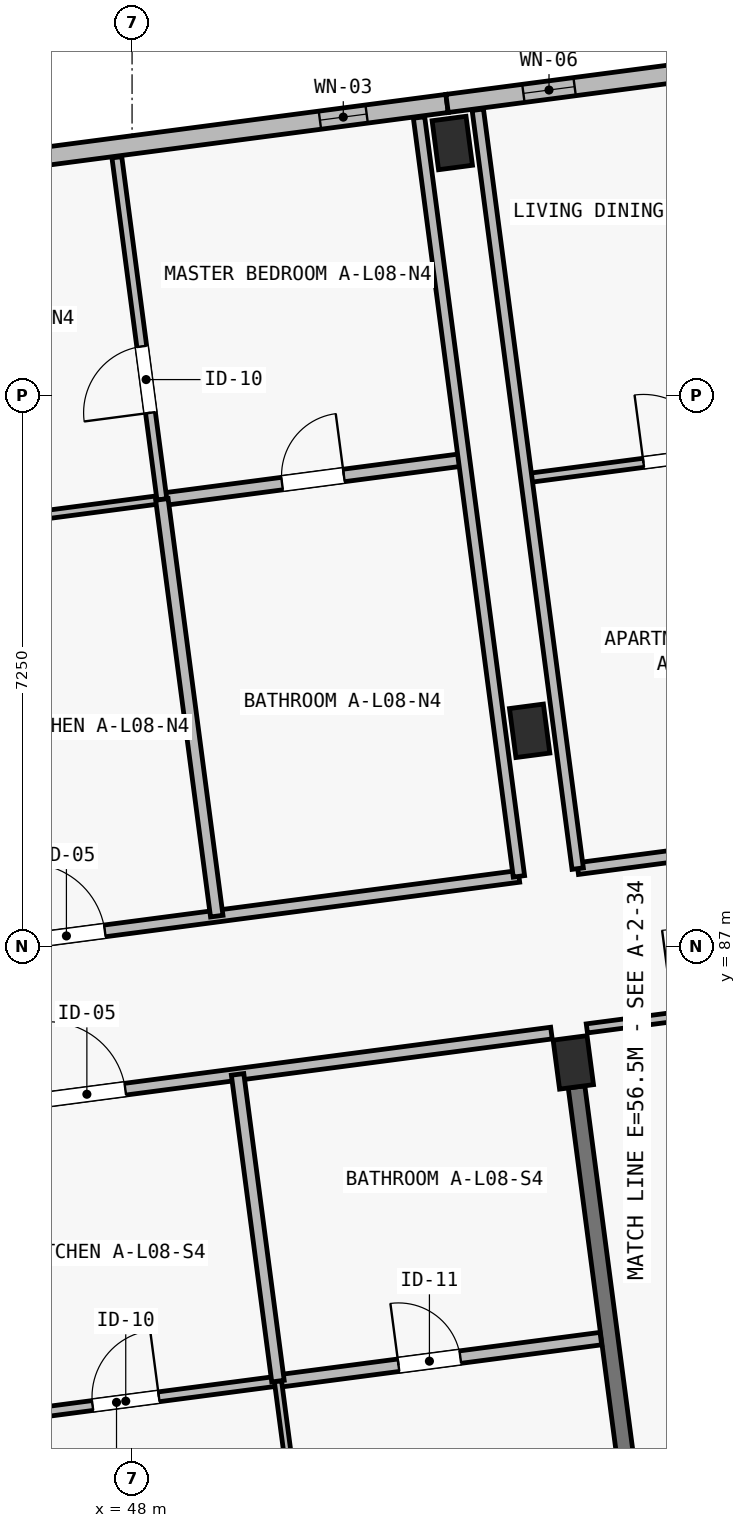
"""IFC4 building model, lengths in metres.
Left out: names, types, materials, properties, quantities, classifications, styles, units other than length and angle.
Written with IfcOpenShell. Run it as: python <this file> out.ifc"""

import sys

from ifc_helpers import new_model, si_unit, direction, frame, frame_2d, origin, origin_2d, place, context, subcontext, project, spatial, rectangle, extrude, element, fill, save


model = new_model("IFC4")
c1 = context("Model", 3, precision=1e-05, world=origin(), true_north=direction((0.0, 1.0)))
c2 = subcontext(c1, "Body", "Model", "MODEL_VIEW")
j1 = project(units=[si_unit("LENGTHUNIT", "METRE"), si_unit("PLANEANGLEUNIT", "RADIAN")], contexts=[c1])
p1 = place(None, origin())
s1 = spatial("IfcSite", under=j1, at=p1, CompositionType="ELEMENT")
p2 = place(p1, origin())
s2 = spatial("IfcBuilding", under=s1, at=p2, CompositionType="ELEMENT")
p3 = place(p2, frame((0.0, 0.0, 27.9)))
s3 = spatial("IfcBuildingStorey", under=s2, at=p3, CompositionType="ELEMENT", Elevation=27.9)
for number, where, z_axis, x_axis in (
    (1, (53.805, 85.476, 0.0), (0.0, 0.0, 1.0), (0.991, 0.131, 0.0)),
    (2, (53.231, 89.839, 0.0), (0.0, 0.0, 1.0), (0.991, 0.131, 0.0)),
    (3, (52.213, 97.572, 0.0), (0.0, 0.0, 1.0), (0.991, 0.131, 0.0)),
):
    element("IfcColumn", number, at=place(p3, frame(where, z_axis=z_axis, x_axis=x_axis)), inside=s3, PredefinedType="COLUMN", context=c2, shape_type="SweptSolid", body=[
        extrude(rectangle(XDim=0.45, YDim=0.65, at=origin_2d()), origin(), (0.0, 0.0, 1.0), 3.25),
    ])
p4 = place(p3, frame((54.781, 78.065, 0.0), z_axis=(0.0, 0.0, 1.0), x_axis=(-0.130537539388, 0.991443367425, 0.0)))
e4 = element("IfcWall", 4, at=p4, inside=s3, PredefinedType="SHEAR", context=c2, shape_type="SweptSolid", body=[
    extrude(rectangle(XDim=7.15, YDim=0.22, at=frame_2d((3.575, 0.0))), origin(), (0.0, 0.0, 1.0), 2.5),
])
p5 = place(p3, frame((43.42, 96.944, 0.0), z_axis=(0.0, 0.0, 1.0), x_axis=(0.991443905089, 0.130533455715, 0.0)))
e5 = element("IfcWall", 5, at=p5, inside=s3, PredefinedType="SOLIDWALL", context=c2, shape_type="SweptSolid", body=[
    extrude(rectangle(XDim=8.8, YDim=0.24, at=frame_2d((4.4, 0.0))), origin(), (0.0, 0.0, 1.0), 3.0),
])
p6 = place(p5, frame((1.552, 0.0, 0.44)))
e6 = element("IfcOpeningElement", 6, at=p6, cuts=e5, PredefinedType="OPENING", context=c2, shape_type="SweptSolid", body=[
    extrude(rectangle(XDim=0.84, YDim=2.28, at=frame_2d((0.42, 1.14))), frame((0.0, 0.135, 0.0), z_axis=(0.0, -1.0, 0.0), x_axis=(1.0, 0.0, 0.0)), (0.0, 0.0, 1.0), 0.27),
])
p7 = place(p5, frame((7.113, 0.0, 0.5)))
e7 = element("IfcOpeningElement", 7, at=p7, cuts=e5, PredefinedType="OPENING", context=c2, shape_type="SweptSolid", body=[
    extrude(rectangle(XDim=0.62, YDim=2.28, at=frame_2d((0.31, 1.14))), frame((0.0, 0.135, 0.0), z_axis=(0.0, -1.0, 0.0), x_axis=(1.0, 0.0, 0.0)), (0.0, 0.0, 1.0), 0.27),
])
p8 = place(p3, frame((52.145, 98.093, 0.0), z_axis=(0.0, 0.0, 1.0), x_axis=(0.991442885224, 0.130541201693, 0.0)))
e8 = element("IfcWall", 8, at=p8, inside=s3, PredefinedType="SOLIDWALL", context=c2, shape_type="SweptSolid", body=[
    extrude(rectangle(XDim=9.325, YDim=0.24, at=frame_2d((4.663, 0.0))), origin(), (0.0, 0.0, 1.0), 3.0),
])
p9 = place(p8, frame((1.013, 0.0, 0.5)))
e9 = element("IfcOpeningElement", 9, at=p9, cuts=e8, PredefinedType="OPENING", context=c2, shape_type="SweptSolid", body=[
    extrude(rectangle(XDim=0.68, YDim=2.24, at=frame_2d((0.34, 1.12))), frame((0.0, 0.135, 0.0), z_axis=(0.0, -1.0, 0.0), x_axis=(1.0, 0.0, 0.0)), (0.0, 0.0, 1.0), 0.27),
])
p10 = place(p8, frame((6.448, 0.0, 0.44)))
e10 = element("IfcOpeningElement", 10, at=p10, cuts=e8, PredefinedType="OPENING", context=c2, shape_type="SweptSolid", body=[
    extrude(rectangle(XDim=0.76, YDim=2.34, at=frame_2d((0.38, 1.17))), frame((0.0, 0.135, 0.0), z_axis=(0.0, -1.0, 0.0), x_axis=(1.0, 0.0, 0.0)), (0.0, 0.0, 1.0), 0.27),
])
p11 = place(p3, frame((45.259, 84.775, 0.0), z_axis=(0.0, 0.0, 1.0), x_axis=(0.991446412738, 0.130514407897, 0.0)))
e11 = element("IfcWall", 11, at=p11, inside=s3, PredefinedType="PARTITIONING", context=c2, shape_type="SweptSolid", body=[
    extrude(rectangle(XDim=8.33, YDim=0.155, at=frame_2d((4.165, 0.0))), origin(), (0.0, 0.0, 1.0), 2.97),
])
p12 = place(p11, frame((1.655, 0.0, 0.0)))
e12 = element("IfcOpeningElement", 12, at=p12, cuts=e11, PredefinedType="OPENING", context=c2, shape_type="SweptSolid", body=[
    extrude(rectangle(XDim=1.02, YDim=2.2, at=frame_2d((0.51, 1.1))), frame((0.0, 0.093, 0.0), z_axis=(0.0, -1.0, 0.0), x_axis=(1.0, 0.0, 0.0)), (0.0, 0.0, 1.0), 0.185),
])
p13 = place(p3, frame((45.671, 80.724, 0.0), z_axis=(0.0, 0.0, 1.0), x_axis=(0.991444014242, 0.130532626667, 0.0)))
e13 = element("IfcWall", 13, at=p13, inside=s3, PredefinedType="PARTITIONING", context=c2, shape_type="SweptSolid", body=[
    extrude(rectangle(XDim=4.285, YDim=0.13, at=frame_2d((2.143, 0.0))), origin(), (0.0, 0.0, 1.0), 2.97),
])
p14 = place(p13, frame((1.825, 0.0, 0.0)))
e14 = element("IfcOpeningElement", 14, at=p14, cuts=e13, PredefinedType="OPENING", context=c2, shape_type="SweptSolid", body=[
    extrude(rectangle(XDim=0.88, YDim=2.1, at=frame_2d((0.44, 1.05))), frame((0.0, 0.08, 0.0), z_axis=(0.0, -1.0, 0.0), x_axis=(1.0, 0.0, 0.0)), (0.0, 0.0, 1.0), 0.16),
])
p15 = place(p3, frame((49.919, 81.283, 0.0), z_axis=(0.0, 0.0, 1.0), x_axis=(0.991452356241, 0.130469250419, 0.0)))
e15 = element("IfcWall", 15, at=p15, inside=s3, PredefinedType="PLUMBINGWALL", context=c2, shape_type="SweptSolid", body=[
    extrude(rectangle(XDim=4.285, YDim=0.165, at=frame_2d((2.143, 0.0))), origin(), (0.0, 0.0, 1.0), 2.97),
])
p16 = place(p15, frame((1.6, 0.0, 0.0)))
e16 = element("IfcOpeningElement", 16, at=p16, cuts=e15, PredefinedType="OPENING", context=c2, shape_type="SweptSolid", body=[
    extrude(rectangle(XDim=0.82, YDim=2.08, at=frame_2d((0.41, 1.04))), frame((0.0, 0.097, 0.0), z_axis=(0.0, -1.0, 0.0), x_axis=(1.0, 0.0, 0.0)), (0.0, 0.0, 1.0), 0.195),
])
p17 = place(p3, frame((50.512, 76.782, 0.0), z_axis=(0.0, 0.0, 1.0), x_axis=(-0.130564403497, 0.991439830015, 0.0)))
e17 = element("IfcWall", 17, at=p17, inside=s3, PredefinedType="PARTITIONING", context=c2, shape_type="SweptSolid", body=[
    extrude(rectangle(XDim=4.54, YDim=0.095, at=frame_2d((2.27, 0.0))), origin(), (0.0, 0.0, 1.0), 2.97),
])
p18 = place(p17, frame((1.35, 0.0, 0.0)))
e18 = element("IfcOpeningElement", 18, at=p18, cuts=e17, PredefinedType="OPENING", context=c2, shape_type="SweptSolid", body=[
    extrude(rectangle(XDim=0.9, YDim=2.1, at=frame_2d((0.45, 1.05))), frame((0.0, 0.062, 0.0), z_axis=(0.0, -1.0, 0.0), x_axis=(1.0, 0.0, 0.0)), (0.0, 0.0, 1.0), 0.125),
])
p19 = place(p3, frame((49.919, 81.283, 0.0), z_axis=(0.0, 0.0, 1.0), x_axis=(-0.13052899417, 0.991444492486, 0.0)))
e19 = element("IfcWall", 19, at=p19, inside=s3, PredefinedType="PLUMBINGWALL", context=c2, shape_type="SweptSolid", body=[
    extrude(rectangle(XDim=4.07, YDim=0.165, at=frame_2d((2.035, 0.0))), origin(), (0.0, 0.0, 1.0), 2.97),
])
p20 = place(p3, frame((53.984, 85.924, 0.0), z_axis=(0.0, 0.0, 1.0), x_axis=(0.991446810256, 0.130511388136, 0.0)))
e20 = element("IfcWall", 20, at=p20, inside=s3, PredefinedType="PARTITIONING", context=c2, shape_type="SweptSolid", body=[
    extrude(rectangle(XDim=5.885, YDim=0.12, at=frame_2d((2.942, 0.0))), origin(), (0.0, 0.0, 1.0), 2.97),
])
p21 = place(p20, frame((1.15, 0.0, 0.0)))
e21 = element("IfcOpeningElement", 21, at=p21, cuts=e20, PredefinedType="OPENING", context=c2, shape_type="SweptSolid", body=[
    extrude(rectangle(XDim=1.15, YDim=2.15, at=frame_2d((0.575, 1.075))), frame((0.0, 0.075, 0.0), z_axis=(0.0, -1.0, 0.0), x_axis=(1.0, 0.0, 0.0)), (0.0, 0.0, 1.0), 0.15),
])
p22 = place(p3, frame((45.138, 86.877, 0.0), z_axis=(0.0, 0.0, 1.0), x_axis=(0.991444034844, 0.130532470184, 0.0)))
e22 = element("IfcWall", 22, at=p22, inside=s3, PredefinedType="PARTITIONING", context=c2, shape_type="SweptSolid", body=[
    extrude(rectangle(XDim=8.02, YDim=0.155, at=frame_2d((4.01, 0.0))), origin(), (0.0, 0.0, 1.0), 2.97),
])
p23 = place(p22, frame((1.505, 0.0, 0.0)))
e23 = element("IfcOpeningElement", 23, at=p23, cuts=e22, PredefinedType="OPENING", context=c2, shape_type="SweptSolid", body=[
    extrude(rectangle(XDim=1.02, YDim=2.2, at=frame_2d((0.51, 1.1))), frame((0.0, 0.093, 0.0), z_axis=(0.0, -1.0, 0.0), x_axis=(1.0, 0.0, 0.0)), (0.0, 0.0, 1.0), 0.185),
])
p24 = place(p3, frame((44.417, 92.36, 0.0), z_axis=(0.0, 0.0, 1.0), x_axis=(0.991443516139, 0.130536409887, 0.0)))
e24 = element("IfcWall", 24, at=p24, inside=s3, PredefinedType="PARTITIONING", context=c2, shape_type="SweptSolid", body=[
    extrude(rectangle(XDim=4.01, YDim=0.11, at=frame_2d((2.005, 0.0))), origin(), (0.0, 0.0, 1.0), 2.97),
])
p25 = place(p24, frame((1.555, 0.0, 0.0)))
e25 = element("IfcOpeningElement", 25, at=p25, cuts=e24, PredefinedType="OPENING", context=c2, shape_type="SweptSolid", body=[
    extrude(rectangle(XDim=0.9, YDim=2.1, at=frame_2d((0.45, 1.05))), frame((0.0, 0.07, 0.0), z_axis=(0.0, -1.0, 0.0), x_axis=(1.0, 0.0, 0.0)), (0.0, 0.0, 1.0), 0.14),
])
p26 = place(p3, frame((48.392, 92.883, 0.0), z_axis=(0.0, 0.0, 1.0), x_axis=(0.991444553502, 0.130528530716, 0.0)))
e26 = element("IfcWall", 26, at=p26, inside=s3, PredefinedType="PLUMBINGWALL", context=c2, shape_type="SweptSolid", body=[
    extrude(rectangle(XDim=4.01, YDim=0.165, at=frame_2d((2.005, 0.0))), origin(), (0.0, 0.0, 1.0), 2.97),
])
p27 = place(p26, frame((1.595, 0.0, 0.0)))
e27 = element("IfcOpeningElement", 27, at=p27, cuts=e26, PredefinedType="OPENING", context=c2, shape_type="SweptSolid", body=[
    extrude(rectangle(XDim=0.82, YDim=2.08, at=frame_2d((0.41, 1.04))), frame((0.0, 0.097, 0.0), z_axis=(0.0, -1.0, 0.0), x_axis=(1.0, 0.0, 0.0)), (0.0, 0.0, 1.0), 0.195),
])
p28 = place(p3, frame((48.392, 92.883, 0.0), z_axis=(0.0, 0.0, 1.0), x_axis=(-0.130518503748, 0.99144587355, 0.0)))
e28 = element("IfcWall", 28, at=p28, inside=s3, PredefinedType="PARTITIONING", context=c2, shape_type="SweptSolid", body=[
    extrude(rectangle(XDim=4.54, YDim=0.13, at=frame_2d((2.27, 0.0))), origin(), (0.0, 0.0, 1.0), 2.97),
])
p29 = place(p28, frame((1.15, 0.0, 0.0)))
e29 = element("IfcOpeningElement", 29, at=p29, cuts=e28, PredefinedType="OPENING", context=c2, shape_type="SweptSolid", body=[
    extrude(rectangle(XDim=0.88, YDim=2.1, at=frame_2d((0.44, 1.05))), frame((0.0, 0.08, 0.0), z_axis=(0.0, -1.0, 0.0), x_axis=(1.0, 0.0, 0.0)), (0.0, 0.0, 1.0), 0.16),
])
p30 = place(p3, frame((49.114, 87.401, 0.0), z_axis=(0.0, 0.0, 1.0), x_axis=(-0.130547016415, 0.991442119594, 0.0)))
e30 = element("IfcWall", 30, at=p30, inside=s3, PredefinedType="PLUMBINGWALL", context=c2, shape_type="SweptSolid", body=[
    extrude(rectangle(XDim=5.53, YDim=0.165, at=frame_2d((2.765, 0.0))), origin(), (0.0, 0.0, 1.0), 2.97),
])
p31 = place(p3, frame((53.09, 87.924, 0.0), z_axis=(0.0, 0.0, 1.0), x_axis=(-0.130534161944, 0.991443812107, 0.0)))
e31 = element("IfcWall", 31, at=p31, inside=s3, PredefinedType="PARTITIONING", context=c2, shape_type="SweptSolid", body=[
    extrude(rectangle(XDim=10.07, YDim=0.15, at=frame_2d((5.035, 0.0))), origin(), (0.0, 0.0, 1.0), 2.97),
])
p32 = place(p3, frame((53.863, 88.026, 0.0), z_axis=(0.0, 0.0, 1.0), x_axis=(0.991447973994, 0.130502547346, 0.0)))
e32 = element("IfcWall", 32, at=p32, inside=s3, PredefinedType="PARTITIONING", context=c2, shape_type="SweptSolid", body=[
    extrude(rectangle(XDim=8.02, YDim=0.155, at=frame_2d((4.01, 0.0))), origin(), (0.0, 0.0, 1.0), 2.97),
])
p33 = place(p32, frame((1.505, 0.0, 0.0)))
e33 = element("IfcOpeningElement", 33, at=p33, cuts=e32, PredefinedType="OPENING", context=c2, shape_type="SweptSolid", body=[
    extrude(rectangle(XDim=0.98, YDim=2.15, at=frame_2d((0.49, 1.075))), frame((0.0, 0.093, 0.0), z_axis=(0.0, -1.0, 0.0), x_axis=(1.0, 0.0, 0.0)), (0.0, 0.0, 1.0), 0.185),
])
p34 = place(p3, frame((53.187, 93.161, 0.0), z_axis=(0.0, 0.0, 1.0), x_axis=(0.991444553502, 0.130528530716, 0.0)))
e34 = element("IfcWall", 34, at=p34, inside=s3, PredefinedType="PARTITIONING", context=c2, shape_type="SweptSolid", body=[
    extrude(rectangle(XDim=4.01, YDim=0.12, at=frame_2d((2.005, 0.0))), origin(), (0.0, 0.0, 1.0), 2.97),
])
p35 = place(p34, frame((1.555, 0.0, 0.0)))
e35 = element("IfcOpeningElement", 35, at=p35, cuts=e34, PredefinedType="OPENING", context=c2, shape_type="SweptSolid", body=[
    extrude(rectangle(XDim=0.9, YDim=2.1, at=frame_2d((0.45, 1.05))), frame((0.0, 0.075, 0.0), z_axis=(0.0, -1.0, 0.0), x_axis=(1.0, 0.0, 0.0)), (0.0, 0.0, 1.0), 0.15),
])
p36 = place(p3, frame((53.863, 88.026, 0.0), z_axis=(0.0, 0.0, 1.0), x_axis=(-0.130534161944, 0.991443812107, 0.0)))
e36 = element("IfcWall", 36, at=p36, inside=s3, PredefinedType="PARTITIONING", context=c2, shape_type="SweptSolid", body=[
    extrude(rectangle(XDim=10.07, YDim=0.15, at=frame_2d((5.035, 0.0))), origin(), (0.0, 0.0, 1.0), 2.97),
])
p37 = place(p7, origin())
e37 = element("IfcWindow", 37, at=p37, inside=s3, PartitioningType="SINGLE_PANEL", PredefinedType="WINDOW", context=c2, shape_type="SweptSolid", body=[
    extrude(rectangle(XDim=0.62, YDim=2.28, at=frame_2d((0.31, 1.14))), frame((0.0, 0.03, 0.0), z_axis=(0.0, -1.0, 0.0), x_axis=(1.0, 0.0, 0.0)), (0.0, 0.0, 1.0), 0.06),
])
fill(e7, e37)
p38 = place(p9, origin())
e38 = element("IfcWindow", 38, at=p38, inside=s3, PartitioningType="SINGLE_PANEL", PredefinedType="WINDOW", context=c2, shape_type="SweptSolid", body=[
    extrude(rectangle(XDim=0.68, YDim=2.24, at=frame_2d((0.34, 1.12))), frame((0.0, 0.03, 0.0), z_axis=(0.0, -1.0, 0.0), x_axis=(1.0, 0.0, 0.0)), (0.0, 0.0, 1.0), 0.06),
])
fill(e9, e38)
p39 = place(p12, origin())
e39 = element("IfcDoor", 39, at=p39, inside=s3, OperationType="SINGLE_SWING_LEFT", PredefinedType="DOOR", context=c2, shape_type="SweptSolid", body=[
    extrude(rectangle(XDim=1.02, YDim=2.2, at=frame_2d((0.51, 1.1))), frame((0.0, 0.025, 0.0), z_axis=(0.0, -1.0, 0.0), x_axis=(1.0, 0.0, 0.0)), (0.0, 0.0, 1.0), 0.05),
])
fill(e12, e39)
p40 = place(p14, origin())
e40 = element("IfcDoor", 40, at=p40, inside=s3, OperationType="SINGLE_SWING_RIGHT", PredefinedType="DOOR", context=c2, shape_type="SweptSolid", body=[
    extrude(rectangle(XDim=0.88, YDim=2.1, at=frame_2d((0.44, 1.05))), frame((0.0, 0.025, 0.0), z_axis=(0.0, -1.0, 0.0), x_axis=(1.0, 0.0, 0.0)), (0.0, 0.0, 1.0), 0.05),
])
fill(e14, e40)
p41 = place(p16, origin())
e41 = element("IfcDoor", 41, at=p41, inside=s3, OperationType="SINGLE_SWING_LEFT", PredefinedType="DOOR", context=c2, shape_type="SweptSolid", body=[
    extrude(rectangle(XDim=0.82, YDim=2.08, at=frame_2d((0.41, 1.04))), frame((0.0, 0.025, 0.0), z_axis=(0.0, -1.0, 0.0), x_axis=(1.0, 0.0, 0.0)), (0.0, 0.0, 1.0), 0.05),
])
fill(e16, e41)
p42 = place(p23, origin())
e42 = element("IfcDoor", 42, at=p42, inside=s3, OperationType="SINGLE_SWING_LEFT", PredefinedType="DOOR", context=c2, shape_type="SweptSolid", body=[
    extrude(rectangle(XDim=1.02, YDim=2.2, at=frame_2d((0.51, 1.1))), frame((0.0, 0.025, 0.0), z_axis=(0.0, -1.0, 0.0), x_axis=(1.0, 0.0, 0.0)), (0.0, 0.0, 1.0), 0.05),
])
fill(e23, e42)
p43 = place(p27, origin())
e43 = element("IfcDoor", 43, at=p43, inside=s3, OperationType="SINGLE_SWING_RIGHT", PredefinedType="DOOR", context=c2, shape_type="SweptSolid", body=[
    extrude(rectangle(XDim=0.82, YDim=2.08, at=frame_2d((0.41, 1.04))), frame((0.0, 0.025, 0.0), z_axis=(0.0, -1.0, 0.0), x_axis=(1.0, 0.0, 0.0)), (0.0, 0.0, 1.0), 0.05),
])
fill(e27, e43)
p44 = place(p29, origin())
e44 = element("IfcDoor", 44, at=p44, inside=s3, OperationType="SINGLE_SWING_LEFT", PredefinedType="DOOR", context=c2, shape_type="SweptSolid", body=[
    extrude(rectangle(XDim=0.88, YDim=2.1, at=frame_2d((0.44, 1.05))), frame((0.0, 0.025, 0.0), z_axis=(0.0, -1.0, 0.0), x_axis=(1.0, 0.0, 0.0)), (0.0, 0.0, 1.0), 0.05),
])
fill(e29, e44)
p45 = place(p35, origin())
e45 = element("IfcDoor", 45, at=p45, inside=s3, OperationType="SINGLE_SWING_LEFT", PredefinedType="DOOR", context=c2, shape_type="SweptSolid", body=[
    extrude(rectangle(XDim=0.9, YDim=2.1, at=frame_2d((0.45, 1.05))), frame((0.0, 0.025, 0.0), z_axis=(0.0, -1.0, 0.0), x_axis=(1.0, 0.0, 0.0)), (0.0, 0.0, 1.0), 0.05),
])
fill(e35, e45)
save(model, sys.argv[1])
